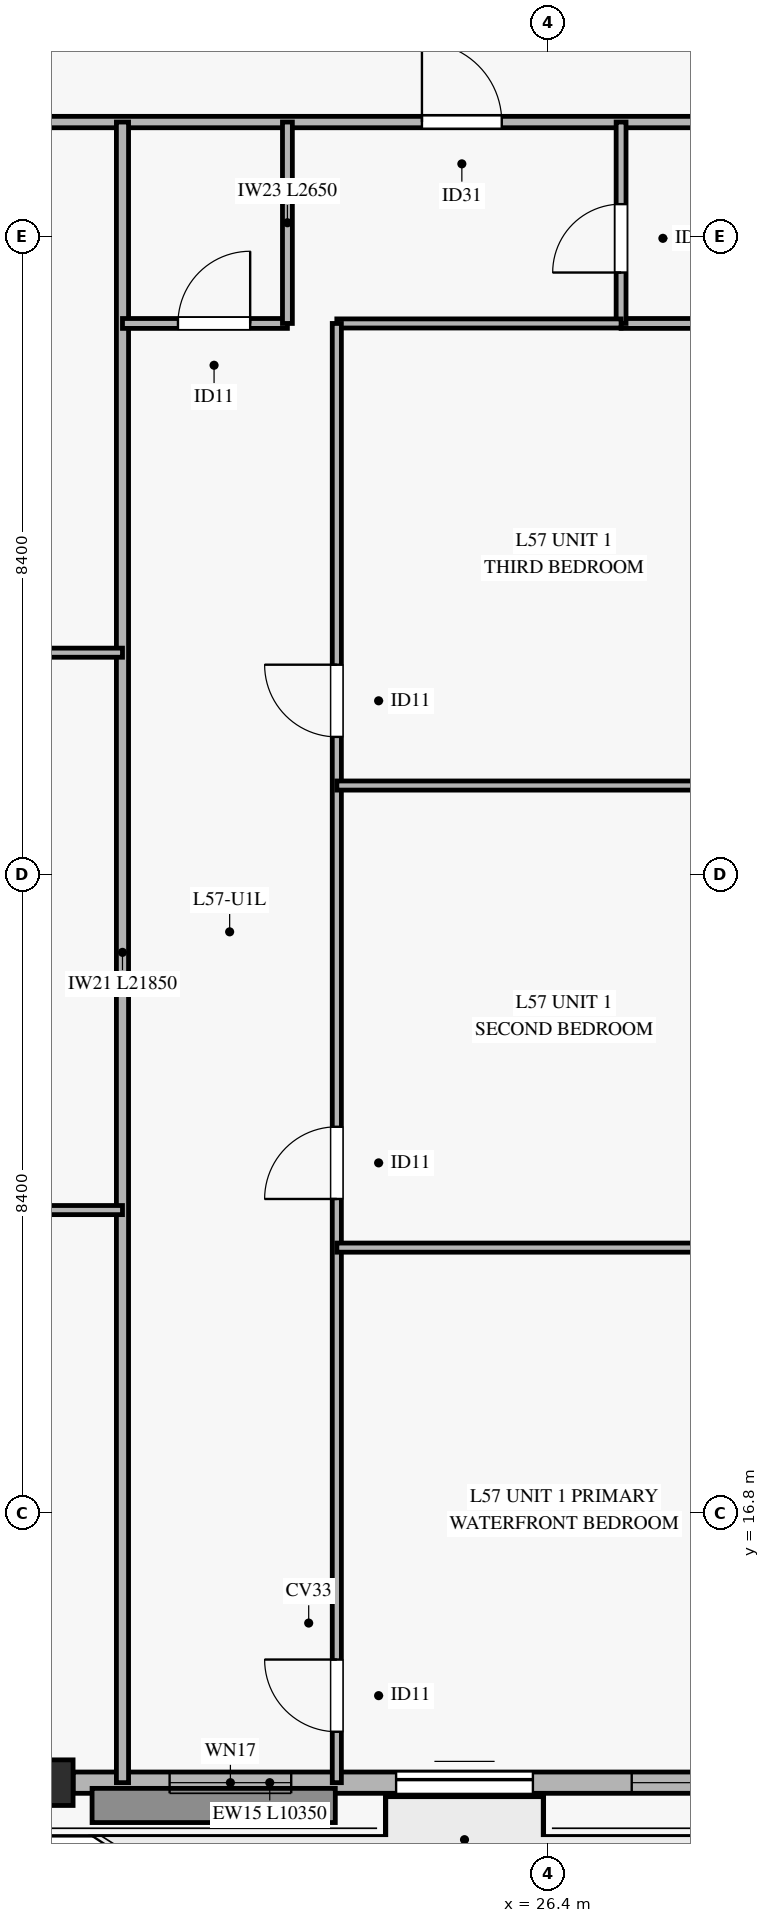
"""IFC4 building model, lengths in metres.
Left out: names, types, materials, properties, quantities, classifications, styles, units other than length and angle.
Written with IfcOpenShell. Run it as: python <this file> out.ifc"""

import sys

from ifc_helpers import new_model, si_unit, direction, frame, frame_2d, origin, origin_2d, place, context, subcontext, project, spatial, rectangle, hollow_rectangle, extrude, source, transform, mapped, element, fill, save


model = new_model("IFC4")
c1 = context("Model", 3, precision=1e-05, world=origin(), true_north=direction((0.0, 1.0)))
c2 = subcontext(c1, "Body", "Model", "MODEL_VIEW")
j1 = project(units=[si_unit("LENGTHUNIT", "METRE"), si_unit("PLANEANGLEUNIT", "RADIAN")], contexts=[c1])
p1 = place(None, origin())
s1 = spatial("IfcSite", under=j1, at=p1, CompositionType="ELEMENT")
p2 = place(p1, origin())
s2 = spatial("IfcBuilding", under=s1, at=p2, CompositionType="ELEMENT")
p3 = place(p2, frame((0.0, 0.0, 227.0)))
s3 = spatial("IfcBuildingStorey", under=s2, at=p3, CompositionType="ELEMENT", Elevation=227.0)
m1 = source(origin(), c2, "Body", "SweptSolid", [
    extrude(hollow_rectangle(XDim=0.6, YDim=0.6, WallThickness=0.028, at=origin_2d()), origin(), (0.0, 0.0, 1.0), 3.185),
])
p4 = place(p3, frame((19.85, 13.25, 0.0), z_axis=(0.0, 0.0, 1.0), x_axis=(1.0, 0.0, 0.0)))
e1 = element("IfcColumn", 1, at=p4, inside=s3, PredefinedType="COLUMN", context=c2, shape_type="MappedRepresentation", body=[
    mapped(m1, transform((0.0, 0.0, 0.0), x_axis=(1.0, 0.0, 0.0), y_axis=(0.0, 1.0, 0.0), z_axis=(0.0, 0.0, 1.0), scale=1.0)),
])
p5 = place(p3, frame((20.15, 13.25, 0.0), z_axis=(0.0, 0.0, 1.0), x_axis=(1.0, 0.0, 0.0)))
e2 = element("IfcWall", 2, at=p5, inside=s3, PredefinedType="SOLIDWALL", context=c2, shape_type="SweptSolid", body=[
    extrude(rectangle(XDim=10.35, YDim=0.28, at=frame_2d((5.175, 0.0))), origin(), (0.0, 0.0, 1.0), 2.815),
])
p6 = place(p5, frame((4.25, 0.0, 0.0)))
e3 = element("IfcOpeningElement", 3, at=p6, cuts=e2, PredefinedType="OPENING", context=c2, shape_type="SweptSolid", body=[
    extrude(rectangle(XDim=1.8, YDim=2.25, at=frame_2d((0.9, 1.125))), frame((0.0, 0.15, 0.0), z_axis=(0.0, -1.0, 0.0), x_axis=(1.0, 0.0, 0.0)), (0.0, 0.0, 1.0), 0.3),
])
p7 = place(p5, frame((1.27, 0.0, 0.45)))
e4 = element("IfcOpeningElement", 4, at=p7, cuts=e2, PredefinedType="OPENING", context=c2, shape_type="SweptSolid", body=[
    extrude(rectangle(XDim=1.6, YDim=2.0, at=frame_2d((0.8, 1.0))), frame((0.0, 0.15, 0.0), z_axis=(0.0, -1.0, 0.0), x_axis=(1.0, 0.0, 0.0)), (0.0, 0.0, 1.0), 0.3),
])
p8 = place(p5, frame((7.35, 0.0, 0.45)))
e5 = element("IfcOpeningElement", 5, at=p8, cuts=e2, PredefinedType="OPENING", context=c2, shape_type="SweptSolid", body=[
    extrude(rectangle(XDim=1.6, YDim=2.0, at=frame_2d((0.8, 1.0))), frame((0.0, 0.15, 0.0), z_axis=(0.0, -1.0, 0.0), x_axis=(1.0, 0.0, 0.0)), (0.0, 0.0, 1.0), 0.3),
])
p9 = place(p3, frame((7.533, 35.1, 0.0), z_axis=(0.0, 0.0, 1.0), x_axis=(1.0, 0.0, 0.0)))
e6 = element("IfcWall", 6, at=p9, inside=s3, PredefinedType="PARTITIONING", context=c2, shape_type="SweptSolid", body=[
    extrude(rectangle(XDim=55.334, YDim=0.15, at=frame_2d((27.667, 0.0))), origin(), (0.0, 0.0, 1.0), 2.37),
])
p10 = place(p9, frame((5.335, 0.0, 0.0)))
e7 = element("IfcOpeningElement", 7, at=p10, cuts=e6, PredefinedType="OPENING", context=c2, shape_type="SweptSolid", body=[
    extrude(rectangle(XDim=1.05, YDim=2.15, at=frame_2d((0.525, 1.075))), frame((0.0, 0.085, 0.0), z_axis=(0.0, -1.0, 0.0), x_axis=(1.0, 0.0, 0.0)), (0.0, 0.0, 1.0), 0.17),
])
p11 = place(p9, frame((17.207, 0.0, 0.0)))
e8 = element("IfcOpeningElement", 8, at=p11, cuts=e6, PredefinedType="OPENING", context=c2, shape_type="SweptSolid", body=[
    extrude(rectangle(XDim=1.05, YDim=2.15, at=frame_2d((0.525, 1.075))), frame((0.0, 0.085, 0.0), z_axis=(0.0, -1.0, 0.0), x_axis=(1.0, 0.0, 0.0)), (0.0, 0.0, 1.0), 0.17),
])
p12 = place(p9, frame((25.884, 0.0, 0.0)))
e9 = element("IfcOpeningElement", 9, at=p12, cuts=e6, PredefinedType="OPENING", context=c2, shape_type="SweptSolid", body=[
    extrude(rectangle(XDim=1.05, YDim=2.15, at=frame_2d((0.525, 1.075))), frame((0.0, 0.085, 0.0), z_axis=(0.0, -1.0, 0.0), x_axis=(1.0, 0.0, 0.0)), (0.0, 0.0, 1.0), 0.17),
])
p13 = place(p9, frame((35.712, 0.0, 0.0)))
e10 = element("IfcOpeningElement", 10, at=p13, cuts=e6, PredefinedType="OPENING", context=c2, shape_type="SweptSolid", body=[
    extrude(rectangle(XDim=1.05, YDim=2.15, at=frame_2d((0.525, 1.075))), frame((0.0, 0.085, 0.0), z_axis=(0.0, -1.0, 0.0), x_axis=(1.0, 0.0, 0.0)), (0.0, 0.0, 1.0), 0.17),
])
p14 = place(p9, frame((47.078, 0.0, 0.0)))
e11 = element("IfcOpeningElement", 11, at=p14, cuts=e6, PredefinedType="OPENING", context=c2, shape_type="SweptSolid", body=[
    extrude(rectangle(XDim=1.05, YDim=2.15, at=frame_2d((0.525, 1.075))), frame((0.0, 0.085, 0.0), z_axis=(0.0, -1.0, 0.0), x_axis=(1.0, 0.0, 0.0)), (0.0, 0.0, 1.0), 0.17),
])
p15 = place(p3, frame((20.8, 13.25, 0.0), z_axis=(0.0, 0.0, 1.0), x_axis=(0.0, 1.0, 0.0)))
e12 = element("IfcWall", 12, at=p15, inside=s3, PredefinedType="PARTITIONING", context=c2, shape_type="SweptSolid", body=[
    extrude(rectangle(XDim=21.85, YDim=0.16, at=frame_2d((10.925, 0.0))), origin(), (0.0, 0.0, 1.0), 2.77),
])
p16 = place(p3, frame((7.533, 20.784, 0.0), z_axis=(0.0, 0.0, 1.0), x_axis=(1.0, 0.0, 0.0)))
e13 = element("IfcWall", 13, at=p16, inside=s3, PredefinedType="PARTITIONING", context=c2, shape_type="SweptSolid", body=[
    extrude(rectangle(XDim=13.267, YDim=0.12, at=frame_2d((6.634, 0.0))), origin(), (0.0, 0.0, 1.0), 2.37),
])
p17 = place(p16, frame((5.593, 0.0, 0.0)))
e14 = element("IfcOpeningElement", 14, at=p17, cuts=e13, PredefinedType="OPENING", context=c2, shape_type="SweptSolid", body=[
    extrude(rectangle(XDim=0.95, YDim=2.1, at=frame_2d((0.475, 1.05))), frame((0.0, 0.07, 0.0), z_axis=(0.0, -1.0, 0.0), x_axis=(1.0, 0.0, 0.0)), (0.0, 0.0, 1.0), 0.14),
])
p18 = place(p3, frame((7.533, 28.118, 0.0), z_axis=(0.0, 0.0, 1.0), x_axis=(1.0, 0.0, 0.0)))
e15 = element("IfcWall", 15, at=p18, inside=s3, PredefinedType="PARTITIONING", context=c2, shape_type="SweptSolid", body=[
    extrude(rectangle(XDim=13.267, YDim=0.12, at=frame_2d((6.634, 0.0))), origin(), (0.0, 0.0, 1.0), 2.37),
])
p19 = place(p18, frame((5.593, 0.0, 0.0)))
e16 = element("IfcOpeningElement", 16, at=p19, cuts=e15, PredefinedType="OPENING", context=c2, shape_type="SweptSolid", body=[
    extrude(rectangle(XDim=0.95, YDim=2.1, at=frame_2d((0.475, 1.05))), frame((0.0, 0.07, 0.0), z_axis=(0.0, -1.0, 0.0), x_axis=(1.0, 0.0, 0.0)), (0.0, 0.0, 1.0), 0.14),
])
p20 = place(p3, frame((20.8, 32.45, 0.0), z_axis=(0.0, 0.0, 1.0), x_axis=(1.0, 0.0, 0.0)))
e17 = element("IfcWall", 17, at=p20, inside=s3, PredefinedType="PARTITIONING", context=c2, shape_type="SweptSolid", body=[
    extrude(rectangle(XDim=2.17, YDim=0.13, at=frame_2d((1.085, 0.0))), origin(), (0.0, 0.0, 1.0), 2.77),
])
p21 = place(p20, frame((0.73, 0.0, 0.0)))
e18 = element("IfcOpeningElement", 18, at=p21, cuts=e17, PredefinedType="OPENING", context=c2, shape_type="SweptSolid", body=[
    extrude(rectangle(XDim=0.95, YDim=2.1, at=frame_2d((0.475, 1.05))), frame((0.0, 0.075, 0.0), z_axis=(0.0, -1.0, 0.0), x_axis=(1.0, 0.0, 0.0)), (0.0, 0.0, 1.0), 0.15),
])
p22 = place(p3, frame((22.97, 32.45, 0.0), z_axis=(0.0, 0.0, 1.0), x_axis=(0.0, 1.0, 0.0)))
e19 = element("IfcWall", 19, at=p22, inside=s3, PredefinedType="PARTITIONING", context=c2, shape_type="SweptSolid", body=[
    extrude(rectangle(XDim=2.65, YDim=0.13, at=frame_2d((1.325, 0.0))), origin(), (0.0, 0.0, 1.0), 2.77),
])
p23 = place(p3, frame((27.36, 32.45, 0.0), z_axis=(0.0, 0.0, 1.0), x_axis=(1.0, 0.0, 0.0)))
e20 = element("IfcWall", 20, at=p23, inside=s3, PredefinedType="PARTITIONING", context=c2, shape_type="SweptSolid", body=[
    extrude(rectangle(XDim=2.24, YDim=0.13, at=frame_2d((1.12, 0.0))), origin(), (0.0, 0.0, 1.0), 2.77),
])
p24 = place(p3, frame((27.36, 32.45, 0.0), z_axis=(0.0, 0.0, 1.0), x_axis=(0.0, 1.0, 0.0)))
e21 = element("IfcWall", 21, at=p24, inside=s3, PredefinedType="PARTITIONING", context=c2, shape_type="SweptSolid", body=[
    extrude(rectangle(XDim=2.65, YDim=0.13, at=frame_2d((1.325, 0.0))), origin(), (0.0, 0.0, 1.0), 2.77),
])
p25 = place(p24, frame((0.67, 0.0, 0.0)))
e22 = element("IfcOpeningElement", 22, at=p25, cuts=e21, PredefinedType="OPENING", context=c2, shape_type="SweptSolid", body=[
    extrude(rectangle(XDim=0.9, YDim=2.1, at=frame_2d((0.45, 1.05))), frame((0.0, 0.075, 0.0), z_axis=(0.0, -1.0, 0.0), x_axis=(1.0, 0.0, 0.0)), (0.0, 0.0, 1.0), 0.15),
])
p26 = place(p3, frame((23.62, 32.45, 0.0), z_axis=(0.0, 0.0, 1.0), x_axis=(1.0, 0.0, 0.0)))
e23 = element("IfcWall", 23, at=p26, inside=s3, PredefinedType="PARTITIONING", context=c2, shape_type="SweptSolid", body=[
    extrude(rectangle(XDim=3.74, YDim=0.12, at=frame_2d((1.87, 0.0))), origin(), (0.0, 0.0, 1.0), 2.77),
])
p27 = place(p3, frame((23.62, 13.25, 0.0), z_axis=(0.0, 0.0, 1.0), x_axis=(0.0, 1.0, 0.0)))
e24 = element("IfcWall", 24, at=p27, inside=s3, PredefinedType="PARTITIONING", context=c2, shape_type="SweptSolid", body=[
    extrude(rectangle(XDim=19.2, YDim=0.12, at=frame_2d((9.6, 0.0))), origin(), (0.0, 0.0, 1.0), 2.77),
])
p28 = place(p27, frame((0.67, 0.0, 0.0)))
e25 = element("IfcOpeningElement", 25, at=p28, cuts=e24, PredefinedType="OPENING", context=c2, shape_type="SweptSolid", body=[
    extrude(rectangle(XDim=0.95, YDim=2.1, at=frame_2d((0.475, 1.05))), frame((0.0, 0.07, 0.0), z_axis=(0.0, -1.0, 0.0), x_axis=(1.0, 0.0, 0.0)), (0.0, 0.0, 1.0), 0.14),
])
p29 = place(p27, frame((7.68, 0.0, 0.0)))
e26 = element("IfcOpeningElement", 26, at=p29, cuts=e24, PredefinedType="OPENING", context=c2, shape_type="SweptSolid", body=[
    extrude(rectangle(XDim=0.95, YDim=2.1, at=frame_2d((0.475, 1.05))), frame((0.0, 0.07, 0.0), z_axis=(0.0, -1.0, 0.0), x_axis=(1.0, 0.0, 0.0)), (0.0, 0.0, 1.0), 0.14),
])
p30 = place(p27, frame((13.76, 0.0, 0.0)))
e27 = element("IfcOpeningElement", 27, at=p30, cuts=e24, PredefinedType="OPENING", context=c2, shape_type="SweptSolid", body=[
    extrude(rectangle(XDim=0.95, YDim=2.1, at=frame_2d((0.475, 1.05))), frame((0.0, 0.07, 0.0), z_axis=(0.0, -1.0, 0.0), x_axis=(1.0, 0.0, 0.0)), (0.0, 0.0, 1.0), 0.14),
])
for number, where, z_axis, x_axis in (
    (28, (23.62, 20.29, 0.0), (0.0, 0.0, 1.0), (1.0, 0.0, 0.0)),
    (29, (23.62, 26.37, 0.0), (0.0, 0.0, 1.0), (1.0, 0.0, 0.0)),
):
    element("IfcWall", number, at=place(p3, frame(where, z_axis=z_axis, x_axis=x_axis)), inside=s3, PredefinedType="PARTITIONING", context=c2, shape_type="SweptSolid", body=[
        extrude(rectangle(XDim=5.98, YDim=0.12, at=frame_2d((2.99, 0.0))), origin(), (0.0, 0.0, 1.0), 3.185),
    ])
m2 = source(origin(), c2, "Body", "SweptSolid", [
    extrude(rectangle(XDim=1.8, YDim=2.25, at=frame_2d((0.9, 1.125))), frame((0.0, 0.025, 0.0), z_axis=(0.0, -1.0, 0.0), x_axis=(1.0, 0.0, 0.0)), (0.0, 0.0, 1.0), 0.05),
])
p31 = place(p6, origin())
e30 = element("IfcDoor", 30, at=p31, inside=s3, OperationType="SLIDING_TO_LEFT", PredefinedType="DOOR", context=c2, shape_type="MappedRepresentation", body=[
    mapped(m2, transform((0.0, 0.0, 0.0), x_axis=(1.0, 0.0, 0.0), y_axis=(0.0, 1.0, 0.0), z_axis=(0.0, 0.0, 1.0), scale=1.0)),
])
fill(e3, e30)
m3 = source(origin(), c2, "Body", "SweptSolid", [
    extrude(rectangle(XDim=1.6, YDim=2.0, at=frame_2d((0.8, 1.0))), frame((0.0, 0.03, 0.0), z_axis=(0.0, -1.0, 0.0), x_axis=(1.0, 0.0, 0.0)), (0.0, 0.0, 1.0), 0.06),
])
p32 = place(p7, origin())
e31 = element("IfcWindow", 31, at=p32, inside=s3, PartitioningType="SINGLE_PANEL", PredefinedType="WINDOW", context=c2, shape_type="MappedRepresentation", body=[
    mapped(m3, transform((0.0, 0.0, 0.0), x_axis=(1.0, 0.0, 0.0), y_axis=(0.0, 1.0, 0.0), z_axis=(0.0, 0.0, 1.0), scale=1.0)),
])
fill(e4, e31)
p33 = place(p8, origin())
e32 = element("IfcWindow", 32, at=p33, inside=s3, PartitioningType="SINGLE_PANEL", PredefinedType="WINDOW", context=c2, shape_type="MappedRepresentation", body=[
    mapped(m3, transform((0.0, 0.0, 0.0), x_axis=(1.0, 0.0, 0.0), y_axis=(0.0, 1.0, 0.0), z_axis=(0.0, 0.0, 1.0), scale=1.0)),
])
fill(e5, e32)
m4 = source(origin(), c2, "Body", "SweptSolid", [
    extrude(rectangle(XDim=1.05, YDim=2.15, at=frame_2d((0.525, 1.075))), frame((0.0, 0.025, 0.0), z_axis=(0.0, -1.0, 0.0), x_axis=(1.0, 0.0, 0.0)), (0.0, 0.0, 1.0), 0.05),
])
p34 = place(p11, origin())
e33 = element("IfcDoor", 33, at=p34, inside=s3, OperationType="SINGLE_SWING_LEFT", PredefinedType="DOOR", context=c2, shape_type="MappedRepresentation", body=[
    mapped(m4, transform((0.0, 0.0, 0.0), x_axis=(1.0, 0.0, 0.0), y_axis=(0.0, 1.0, 0.0), z_axis=(0.0, 0.0, 1.0), scale=1.0)),
])
fill(e8, e33)
m5 = source(origin(), c2, "Body", "SweptSolid", [
    extrude(rectangle(XDim=0.95, YDim=2.1, at=frame_2d((0.475, 1.05))), frame((0.0, 0.025, 0.0), z_axis=(0.0, -1.0, 0.0), x_axis=(1.0, 0.0, 0.0)), (0.0, 0.0, 1.0), 0.05),
])
p35 = place(p21, origin())
e34 = element("IfcDoor", 34, at=p35, inside=s3, OperationType="SINGLE_SWING_RIGHT", PredefinedType="DOOR", context=c2, shape_type="MappedRepresentation", body=[
    mapped(m5, transform((0.0, 0.0, 0.0), x_axis=(1.0, 0.0, 0.0), y_axis=(0.0, 1.0, 0.0), z_axis=(0.0, 0.0, 1.0), scale=1.0)),
])
fill(e18, e34)
m6 = source(origin(), c2, "Body", "SweptSolid", [
    extrude(rectangle(XDim=0.9, YDim=2.1, at=frame_2d((0.45, 1.05))), frame((0.0, 0.025, 0.0), z_axis=(0.0, -1.0, 0.0), x_axis=(1.0, 0.0, 0.0)), (0.0, 0.0, 1.0), 0.05),
])
p36 = place(p25, origin())
e35 = element("IfcDoor", 35, at=p36, inside=s3, OperationType="SINGLE_SWING_LEFT", PredefinedType="DOOR", context=c2, shape_type="MappedRepresentation", body=[
    mapped(m6, transform((0.0, 0.0, 0.0), x_axis=(1.0, 0.0, 0.0), y_axis=(0.0, 1.0, 0.0), z_axis=(0.0, 0.0, 1.0), scale=1.0)),
])
fill(e22, e35)
p37 = place(p28, origin())
e36 = element("IfcDoor", 36, at=p37, inside=s3, OperationType="SINGLE_SWING_RIGHT", PredefinedType="DOOR", context=c2, shape_type="MappedRepresentation", body=[
    mapped(m5, transform((0.0, 0.0, 0.0), x_axis=(1.0, 0.0, 0.0), y_axis=(0.0, 1.0, 0.0), z_axis=(0.0, 0.0, 1.0), scale=1.0)),
])
fill(e25, e36)
p38 = place(p29, origin())
e37 = element("IfcDoor", 37, at=p38, inside=s3, OperationType="SINGLE_SWING_LEFT", PredefinedType="DOOR", context=c2, shape_type="MappedRepresentation", body=[
    mapped(m5, transform((0.0, 0.0, 0.0), x_axis=(1.0, 0.0, 0.0), y_axis=(0.0, 1.0, 0.0), z_axis=(0.0, 0.0, 1.0), scale=1.0)),
])
fill(e26, e37)
p39 = place(p30, origin())
e38 = element("IfcDoor", 38, at=p39, inside=s3, OperationType="SINGLE_SWING_RIGHT", PredefinedType="DOOR", context=c2, shape_type="MappedRepresentation", body=[
    mapped(m5, transform((0.0, 0.0, 0.0), x_axis=(1.0, 0.0, 0.0), y_axis=(0.0, 1.0, 0.0), z_axis=(0.0, 0.0, 1.0), scale=1.0)),
])
fill(e27, e38)
save(model, sys.argv[1])
